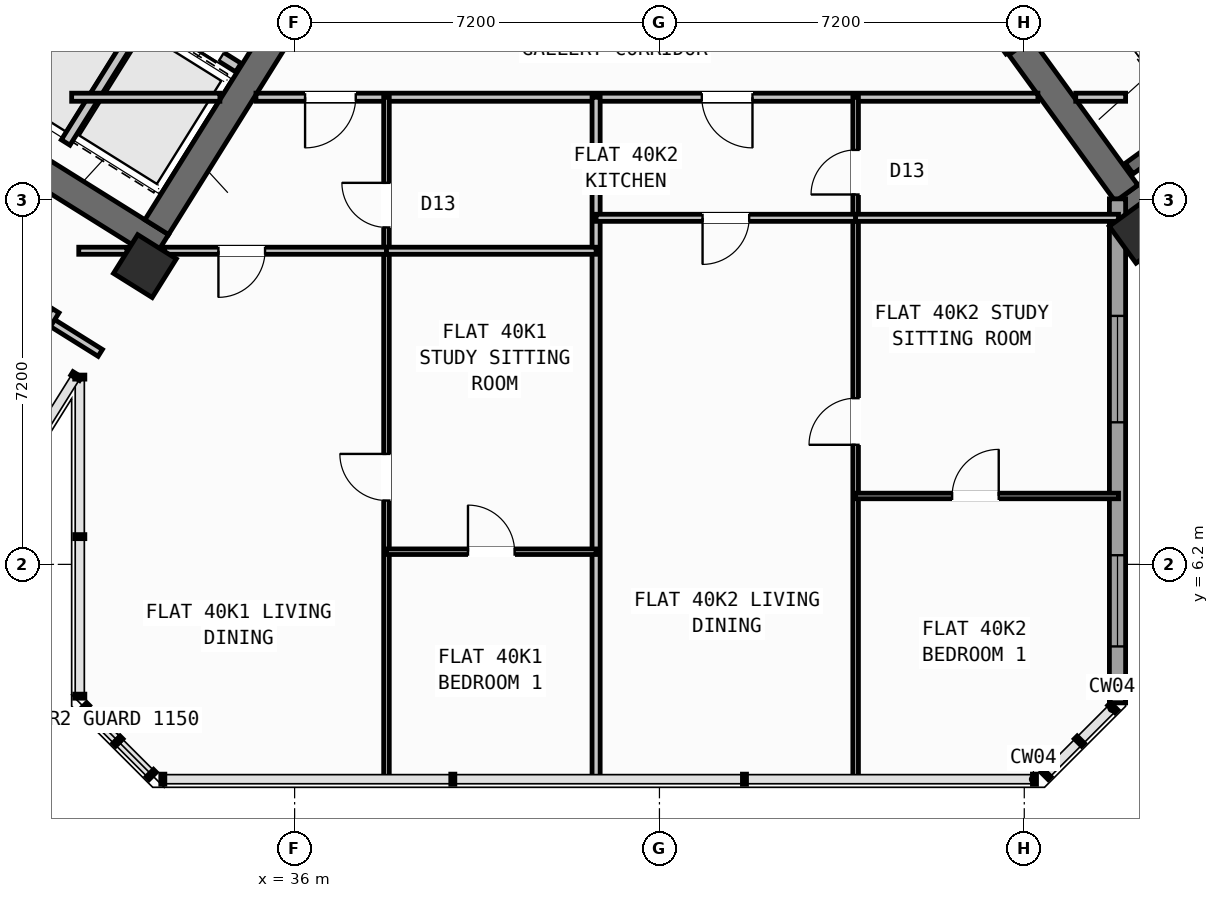
"""IFC4 building model, lengths in metres.
Left out: names, types, materials, properties, quantities, classifications, styles, units other than length and angle.
Written with IfcOpenShell. Run it as: python <this file> out.ifc"""

import sys

from ifc_helpers import new_model, si_unit, direction, frame, frame_2d, origin, origin_2d, place, context, subcontext, project, spatial, rectangle, hollow_rectangle, extrude, source, transform, mapped, element, fill, save


model = new_model("IFC4")
c1 = context("Model", 3, precision=1e-05, world=origin(), true_north=direction((0.0, 1.0)))
c2 = subcontext(c1, "Body", "Model", "MODEL_VIEW")
j1 = project(units=[si_unit("LENGTHUNIT", "METRE"), si_unit("PLANEANGLEUNIT", "RADIAN")], contexts=[c1])
p1 = place(None, origin())
s1 = spatial("IfcSite", under=j1, at=p1, CompositionType="ELEMENT")
p2 = place(p1, origin())
s2 = spatial("IfcBuilding", under=s1, at=p2, CompositionType="ELEMENT")
p3 = place(p2, frame((0.0, 0.0, 158.7)))
s3 = spatial("IfcBuildingStorey", under=s2, at=p3, CompositionType="ELEMENT", Elevation=158.7)
p4 = place(p3, frame((33.366, 12.477, 0.0), z_axis=(0.0, 0.0, 1.0), x_axis=(-0.848047359947, 0.529920442413, 0.0)))
e1 = element("IfcWall", 1, at=p4, inside=s3, PredefinedType="SHEAR", context=c2, shape_type="SweptSolid", body=[
    extrude(rectangle(XDim=13.14, YDim=0.55, at=frame_2d((6.57, 0.0))), origin(), (0.0, 0.0, 1.0), 3.35),
])
p5 = place(p3, frame((36.683, 18.304, 0.0), z_axis=(0.0, 0.0, 1.0), x_axis=(-0.529896466841, -0.848062341122, 0.0)))
e2 = element("IfcWall", 2, at=p5, inside=s3, PredefinedType="SHEAR", context=c2, shape_type="SweptSolid", body=[
    extrude(rectangle(XDim=6.425, YDim=0.55, at=frame_2d((3.212, 0.0))), origin(), (0.0, 0.0, 1.0), 3.35),
])
p6 = place(p3, frame((52.359, 13.14, 0.0), z_axis=(0.0, 0.0, 1.0), x_axis=(0.809014896919, 0.587788139183, 0.0)))
e3 = element("IfcWall", 3, at=p6, inside=s3, PredefinedType="SHEAR", context=c2, shape_type="SweptSolid", body=[
    extrude(rectangle(XDim=12.34, YDim=0.55, at=frame_2d((6.17, 0.0))), origin(), (0.0, 0.0, 1.0), 3.35),
])
p7 = place(p3, frame((52.42, 13.524, 0.0), z_axis=(0.0, 0.0, 1.0), x_axis=(-0.587802113096, 0.809004744015, 0.0)))
e4 = element("IfcWall", 4, at=p7, inside=s3, PredefinedType="SHEAR", context=c2, shape_type="SweptSolid", body=[
    extrude(rectangle(XDim=3.575, YDim=0.55, at=frame_2d((1.788, 0.0))), origin(), (0.0, 0.0, 1.0), 3.35),
])
m1 = source(origin(), c2, "Body", "SweptSolid", [
    extrude(hollow_rectangle(XDim=0.9, YDim=0.9, WallThickness=0.036, at=origin_2d()), origin(), (0.0, 0.0, 1.0), 3.6),
])
for number, where, z_axis, x_axis in (
    (5, (33.046, 12.087, 0.0), (0.0, 0.0, 1.0), (-0.848, 0.53, 0.0)),
    (6, (52.705, 12.773, 0.0), (0.0, 0.0, 1.0), (0.809, 0.588, 0.0)),
):
    element("IfcColumn", number, at=place(p3, frame(where, z_axis=z_axis, x_axis=x_axis)), inside=s3, PredefinedType="COLUMN", context=c2, shape_type="MappedRepresentation", body=[
        mapped(m1, transform((0.0, 0.0, 0.0), scale=1.0)),
    ])
p8 = place(p3, frame((56.581, 7.439, 0.0), z_axis=(0.0, 0.0, 1.0), x_axis=(-0.587771678454, 0.809026856172, 0.0)))
e7 = element("IfcWall", 7, at=p8, inside=s3, PredefinedType="STANDARD", context=c2, shape_type="SweptSolid", body=[
    extrude(rectangle(XDim=6.824, YDim=0.32, at=frame_2d((3.412, 0.0))), origin(), (0.0, 0.0, 1.0), 2.775),
])
p9 = place(p8, frame((1.531, 0.0, 0.8)))
e8 = element("IfcOpeningElement", 8, at=p9, cuts=e7, PredefinedType="OPENING", context=c2, shape_type="SweptSolid", body=[
    extrude(rectangle(XDim=2.1, YDim=1.55, at=frame_2d((1.05, 0.775))), frame((0.0, 0.17, 0.0), z_axis=(0.0, -1.0, 0.0), x_axis=(1.0, 0.0, 0.0)), (0.0, 0.0, 1.0), 0.34),
])
p10 = place(p3, frame((52.24, 13.414, 0.0), z_axis=(0.0, 0.0, 1.0), x_axis=(0.0, -1.0, 0.0)))
e9 = element("IfcWall", 9, at=p10, inside=s3, PredefinedType="STANDARD", context=c2, shape_type="SweptSolid", body=[
    extrude(rectangle(XDim=9.948, YDim=0.32, at=frame_2d((4.974, 0.0))), origin(), (0.0, 0.0, 1.0), 3.35),
])
p11 = place(p10, frame((2.31, 0.0, 0.8)))
e10 = element("IfcOpeningElement", 10, at=p11, cuts=e9, PredefinedType="OPENING", context=c2, shape_type="SweptSolid", body=[
    extrude(rectangle(XDim=2.1, YDim=1.55, at=frame_2d((1.05, 0.775))), frame((0.0, 0.17, 0.0), z_axis=(0.0, -1.0, 0.0), x_axis=(1.0, 0.0, 0.0)), (0.0, 0.0, 1.0), 0.34),
])
p12 = place(p10, frame((7.033, 0.0, 0.85)))
e11 = element("IfcOpeningElement", 11, at=p12, cuts=e9, PredefinedType="OPENING", context=c2, shape_type="SweptSolid", body=[
    extrude(rectangle(XDim=1.8, YDim=1.5, at=frame_2d((0.9, 0.75))), frame((0.0, 0.17, 0.0), z_axis=(0.0, -1.0, 0.0), x_axis=(1.0, 0.0, 0.0)), (0.0, 0.0, 1.0), 0.34),
])
p13 = place(p3, frame((31.288, 18.256, 0.0), z_axis=(0.0, 0.0, 1.0), x_axis=(-0.529943379326, -0.848033026897, 0.0)))
e12 = element("IfcWall", 12, at=p13, inside=s3, PredefinedType="SHEAR", context=c2, shape_type="SweptSolid", body=[
    extrude(rectangle(XDim=3.16, YDim=0.26, at=frame_2d((1.58, 0.0))), origin(), (0.0, 0.0, 1.0), 3.35),
])
p14 = place(p3, frame((34.891, 16.005, 0.0), z_axis=(0.0, 0.0, 1.0), x_axis=(-0.848062873452, 0.529895614884, 0.0)))
e13 = element("IfcWall", 13, at=p14, inside=s3, PredefinedType="STANDARD", context=c2, shape_type="SweptSolid", body=[
    extrude(rectangle(XDim=4.248, YDim=0.2, at=frame_2d((2.124, 0.0))), origin(), (0.0, 0.0, 1.0), 3.34),
])
p15 = place(p14, frame((0.398, 0.0, 0.0)))
e14 = element("IfcOpeningElement", 14, at=p15, cuts=e13, PredefinedType="OPENING", context=c2, shape_type="SweptSolid", body=[
    extrude(rectangle(XDim=1.3, YDim=2.2, at=frame_2d((0.65, 1.1))), frame((0.0, 0.11, 0.0), z_axis=(0.0, -1.0, 0.0), x_axis=(1.0, 0.0, 0.0)), (0.0, 0.0, 1.0), 0.22),
])
p16 = place(p14, frame((2.473, 0.0, 0.0)))
e15 = element("IfcOpeningElement", 15, at=p16, cuts=e13, PredefinedType="OPENING", context=c2, shape_type="SweptSolid", body=[
    extrude(rectangle(XDim=1.45, YDim=2.25, at=frame_2d((0.725, 1.125))), frame((0.0, 0.11, 0.0), z_axis=(0.0, -1.0, 0.0), x_axis=(1.0, 0.0, 0.0)), (0.0, 0.0, 1.0), 0.22),
])
p17 = place(p3, frame((33.029, 17.003, 0.0), z_axis=(0.0, 0.0, 1.0), x_axis=(-0.529916267533, -0.848049968695, 0.0)))
e16 = element("IfcWall", 16, at=p17, inside=s3, PredefinedType="STANDARD", context=c2, shape_type="SweptSolid", body=[
    extrude(rectangle(XDim=2.92, YDim=0.2, at=frame_2d((1.46, 0.0))), origin(), (0.0, 0.0, 1.0), 3.34),
])
p18 = place(p3, frame((52.472, 14.013, 0.0), z_axis=(0.0, 0.0, 1.0), x_axis=(0.809028366311, 0.587769599847, 0.0)))
e17 = element("IfcWall", 17, at=p18, inside=s3, PredefinedType="SHEAR", context=c2, shape_type="SweptSolid", body=[
    extrude(rectangle(XDim=7.33, YDim=0.26, at=frame_2d((3.665, 0.0))), origin(), (0.0, 0.0, 1.0), 3.35),
])
p19 = place(p3, frame((32.164, 10.374, 0.0), z_axis=(0.0, 0.0, 1.0), x_axis=(-0.848044107957, 0.529925646633, 0.0)))
e18 = element("IfcWall", 18, at=p19, inside=s3, PredefinedType="PARTITIONING", context=c2, shape_type="SweptSolid", body=[
    extrude(rectangle(XDim=15.57, YDim=0.16, at=frame_2d((7.785, 0.0))), origin(), (0.0, 0.0, 1.0), 3.34),
])
p20 = place(p19, frame((10.83, 0.0, 0.0)))
e19 = element("IfcOpeningElement", 19, at=p20, cuts=e18, PredefinedType="OPENING", context=c2, shape_type="SweptSolid", body=[
    extrude(rectangle(XDim=1.0, YDim=2.1, at=frame_2d((0.5, 1.05))), frame((0.0, 0.09, 0.0), z_axis=(0.0, -1.0, 0.0), x_axis=(1.0, 0.0, 0.0)), (0.0, 0.0, 1.0), 0.18),
])
p21 = place(p3, frame((31.282, 11.208, 0.0), z_axis=(0.0, 0.0, 1.0), x_axis=(-0.529938869374, -0.84803584519, 0.0)))
e20 = element("IfcWall", 20, at=p21, inside=s3, PredefinedType="PARTITIONING", context=c2, shape_type="SweptSolid", body=[
    extrude(rectangle(XDim=5.48, YDim=0.16, at=frame_2d((2.74, 0.0))), origin(), (0.0, 0.0, 1.0), 3.34),
])
p22 = place(p3, frame((31.6, 15.42, 0.0), z_axis=(0.0, 0.0, 1.0), x_axis=(1.0, 0.0, 0.0)))
e21 = element("IfcWall", 21, at=p22, inside=s3, PredefinedType="PARTITIONING", context=c2, shape_type="SweptSolid", body=[
    extrude(rectangle(XDim=2.925, YDim=0.16, at=frame_2d((1.462, 0.0))), origin(), (0.0, 0.0, 1.0), 3.34),
])
p23 = place(p3, frame((35.237, 15.42, 0.0), z_axis=(0.0, 0.0, 1.0), x_axis=(1.0, 0.0, 0.0)))
e22 = element("IfcWall", 22, at=p23, inside=s3, PredefinedType="PARTITIONING", context=c2, shape_type="SweptSolid", body=[
    extrude(rectangle(XDim=15.432, YDim=0.16, at=frame_2d((7.716, 0.0))), origin(), (0.0, 0.0, 1.0), 3.34),
])
p24 = place(p23, frame((0.969, 0.0, 0.0)))
e23 = element("IfcOpeningElement", 23, at=p24, cuts=e22, PredefinedType="OPENING", context=c2, shape_type="SweptSolid", body=[
    extrude(rectangle(XDim=1.0, YDim=2.1, at=frame_2d((0.5, 1.05))), frame((0.0, 0.09, 0.0), z_axis=(0.0, -1.0, 0.0), x_axis=(1.0, 0.0, 0.0)), (0.0, 0.0, 1.0), 0.18),
])
p25 = place(p23, frame((8.799, 0.0, 0.0)))
e24 = element("IfcOpeningElement", 24, at=p25, cuts=e22, PredefinedType="OPENING", context=c2, shape_type="SweptSolid", body=[
    extrude(rectangle(XDim=1.0, YDim=2.1, at=frame_2d((0.5, 1.05))), frame((0.0, 0.09, 0.0), z_axis=(0.0, -1.0, 0.0), x_axis=(1.0, 0.0, 0.0)), (0.0, 0.0, 1.0), 0.18),
])
p26 = place(p3, frame((51.416, 15.42, 0.0), z_axis=(0.0, 0.0, 1.0), x_axis=(1.0, 0.0, 0.0)))
e25 = element("IfcWall", 25, at=p26, inside=s3, PredefinedType="PARTITIONING", context=c2, shape_type="SweptSolid", body=[
    extrude(rectangle(XDim=0.984, YDim=0.16, at=frame_2d((0.492, 0.0))), origin(), (0.0, 0.0, 1.0), 3.34),
])
p27 = place(p3, frame((50.119, 16.333, 0.0), z_axis=(0.0, 0.0, 1.0), x_axis=(-0.587749856981, 0.809042709391, 0.0)))
e26 = element("IfcWall", 26, at=p27, inside=s3, PredefinedType="STANDARD", context=c2, shape_type="SweptSolid", body=[
    extrude(rectangle(XDim=2.96, YDim=0.2, at=frame_2d((1.48, 0.0))), origin(), (0.0, 0.0, 1.0), 3.34),
])
p28 = place(p27, frame((0.53, 0.0, 0.0)))
e27 = element("IfcOpeningElement", 27, at=p28, cuts=e26, PredefinedType="OPENING", context=c2, shape_type="SweptSolid", body=[
    extrude(rectangle(XDim=1.5, YDim=2.15, at=frame_2d((0.75, 1.075))), frame((0.0, 0.11, 0.0), z_axis=(0.0, -1.0, 0.0), x_axis=(1.0, 0.0, 0.0)), (0.0, 0.0, 1.0), 0.22),
])
p29 = place(p3, frame((41.95, 1.96, 0.0), z_axis=(0.0, 0.0, 1.0), x_axis=(0.0, 1.0, 0.0)))
e28 = element("IfcWall", 28, at=p29, inside=s3, PredefinedType="PARTITIONING", context=c2, shape_type="SweptSolid", body=[
    extrude(rectangle(XDim=13.46, YDim=0.16, at=frame_2d((6.73, 0.0))), origin(), (0.0, 0.0, 1.0), 3.34),
])
p30 = place(p3, frame((37.813, 1.96, 0.0), z_axis=(0.0, 0.0, 1.0), x_axis=(0.0, 1.0, 0.0)))
e29 = element("IfcWall", 29, at=p30, inside=s3, PredefinedType="PARTITIONING", context=c2, shape_type="SweptSolid", body=[
    extrude(rectangle(XDim=13.46, YDim=0.11, at=frame_2d((6.73, 0.0))), origin(), (0.0, 0.0, 1.0), 3.34),
])
p31 = place(p30, frame((5.5, 0.0, 0.0)))
e30 = element("IfcOpeningElement", 30, at=p31, cuts=e29, PredefinedType="OPENING", context=c2, shape_type="SweptSolid", body=[
    extrude(rectangle(XDim=0.92, YDim=2.08, at=frame_2d((0.46, 1.04))), frame((0.0, 0.065, 0.0), z_axis=(0.0, -1.0, 0.0), x_axis=(1.0, 0.0, 0.0)), (0.0, 0.0, 1.0), 0.13),
])
p32 = place(p30, frame((10.89, 0.0, 0.0)))
e31 = element("IfcOpeningElement", 31, at=p32, cuts=e29, PredefinedType="OPENING", context=c2, shape_type="SweptSolid", body=[
    extrude(rectangle(XDim=0.88, YDim=2.08, at=frame_2d((0.44, 1.04))), frame((0.0, 0.065, 0.0), z_axis=(0.0, -1.0, 0.0), x_axis=(1.0, 0.0, 0.0)), (0.0, 0.0, 1.0), 0.13),
])
p33 = place(p3, frame((31.74, 12.39, 0.0), z_axis=(0.0, 0.0, 1.0), x_axis=(1.0, 0.0, 0.0)))
e32 = element("IfcWall", 32, at=p33, inside=s3, PredefinedType="PLUMBINGWALL", context=c2, shape_type="SweptSolid", body=[
    extrude(rectangle(XDim=0.951, YDim=0.14, at=frame_2d((0.475, 0.0))), origin(), (0.0, 0.0, 1.0), 3.34),
])
p34 = place(p3, frame((33.433, 12.39, 0.0), z_axis=(0.0, 0.0, 1.0), x_axis=(1.0, 0.0, 0.0)))
e33 = element("IfcWall", 33, at=p34, inside=s3, PredefinedType="PLUMBINGWALL", context=c2, shape_type="SweptSolid", body=[
    extrude(rectangle(XDim=4.38, YDim=0.14, at=frame_2d((2.19, 0.0))), origin(), (0.0, 0.0, 1.0), 2.525),
])
p35 = place(p34, frame((1.064, 0.0, 0.0)))
e34 = element("IfcOpeningElement", 34, at=p35, cuts=e33, PredefinedType="OPENING", context=c2, shape_type="SweptSolid", body=[
    extrude(rectangle(XDim=0.92, YDim=2.08, at=frame_2d((0.46, 1.04))), frame((0.0, 0.08, 0.0), z_axis=(0.0, -1.0, 0.0), x_axis=(1.0, 0.0, 0.0)), (0.0, 0.0, 1.0), 0.16),
])
p36 = place(p3, frame((37.813, 12.39, 0.0), z_axis=(0.0, 0.0, 1.0), x_axis=(1.0, 0.0, 0.0)))
e35 = element("IfcWall", 35, at=p36, inside=s3, PredefinedType="PLUMBINGWALL", context=c2, shape_type="SweptSolid", body=[
    extrude(rectangle(XDim=4.137, YDim=0.14, at=frame_2d((2.068, 0.0))), origin(), (0.0, 0.0, 1.0), 2.525),
])
p37 = place(p3, frame((37.813, 6.45, 0.0), z_axis=(0.0, 0.0, 1.0), x_axis=(1.0, 0.0, 0.0)))
e36 = element("IfcWall", 36, at=p37, inside=s3, PredefinedType="PARTITIONING", context=c2, shape_type="SweptSolid", body=[
    extrude(rectangle(XDim=4.137, YDim=0.11, at=frame_2d((2.068, 0.0))), origin(), (0.0, 0.0, 1.0), 3.34),
])
p38 = place(p37, frame((1.608, 0.0, 0.0)))
e37 = element("IfcOpeningElement", 37, at=p38, cuts=e36, PredefinedType="OPENING", context=c2, shape_type="SweptSolid", body=[
    extrude(rectangle(XDim=0.92, YDim=2.08, at=frame_2d((0.46, 1.04))), frame((0.0, 0.065, 0.0), z_axis=(0.0, -1.0, 0.0), x_axis=(1.0, 0.0, 0.0)), (0.0, 0.0, 1.0), 0.13),
])
p39 = place(p3, frame((47.072, 1.96, 0.0), z_axis=(0.0, 0.0, 1.0), x_axis=(0.0, 1.0, 0.0)))
e38 = element("IfcWall", 38, at=p39, inside=s3, PredefinedType="PARTITIONING", context=c2, shape_type="SweptSolid", body=[
    extrude(rectangle(XDim=13.46, YDim=0.11, at=frame_2d((6.73, 0.0))), origin(), (0.0, 0.0, 1.0), 3.34),
])
p40 = place(p39, frame((6.6, 0.0, 0.0)))
e39 = element("IfcOpeningElement", 39, at=p40, cuts=e38, PredefinedType="OPENING", context=c2, shape_type="SweptSolid", body=[
    extrude(rectangle(XDim=0.92, YDim=2.08, at=frame_2d((0.46, 1.04))), frame((0.0, 0.065, 0.0), z_axis=(0.0, -1.0, 0.0), x_axis=(1.0, 0.0, 0.0)), (0.0, 0.0, 1.0), 0.13),
])
p41 = place(p39, frame((11.54, 0.0, 0.0)))
e40 = element("IfcOpeningElement", 40, at=p41, cuts=e38, PredefinedType="OPENING", context=c2, shape_type="SweptSolid", body=[
    extrude(rectangle(XDim=0.88, YDim=2.08, at=frame_2d((0.44, 1.04))), frame((0.0, 0.065, 0.0), z_axis=(0.0, -1.0, 0.0), x_axis=(1.0, 0.0, 0.0)), (0.0, 0.0, 1.0), 0.13),
])
p42 = place(p3, frame((41.95, 13.04, 0.0), z_axis=(0.0, 0.0, 1.0), x_axis=(1.0, 0.0, 0.0)))
e41 = element("IfcWall", 41, at=p42, inside=s3, PredefinedType="PLUMBINGWALL", context=c2, shape_type="SweptSolid", body=[
    extrude(rectangle(XDim=5.122, YDim=0.14, at=frame_2d((2.561, 0.0))), origin(), (0.0, 0.0, 1.0), 3.34),
])
p43 = place(p42, frame((2.101, 0.0, 0.0)))
e42 = element("IfcOpeningElement", 42, at=p43, cuts=e41, PredefinedType="OPENING", context=c2, shape_type="SweptSolid", body=[
    extrude(rectangle(XDim=0.92, YDim=2.08, at=frame_2d((0.46, 1.04))), frame((0.0, 0.08, 0.0), z_axis=(0.0, -1.0, 0.0), x_axis=(1.0, 0.0, 0.0)), (0.0, 0.0, 1.0), 0.16),
])
p44 = place(p3, frame((47.072, 13.04, 0.0), z_axis=(0.0, 0.0, 1.0), x_axis=(1.0, 0.0, 0.0)))
e43 = element("IfcWall", 43, at=p44, inside=s3, PredefinedType="PLUMBINGWALL", context=c2, shape_type="SweptSolid", body=[
    extrude(rectangle(XDim=5.188, YDim=0.14, at=frame_2d((2.594, 0.0))), origin(), (0.0, 0.0, 1.0), 2.525),
])
p45 = place(p3, frame((47.072, 7.55, 0.0), z_axis=(0.0, 0.0, 1.0), x_axis=(1.0, 0.0, 0.0)))
e44 = element("IfcWall", 44, at=p45, inside=s3, PredefinedType="PARTITIONING", context=c2, shape_type="SweptSolid", body=[
    extrude(rectangle(XDim=5.188, YDim=0.11, at=frame_2d((2.594, 0.0))), origin(), (0.0, 0.0, 1.0), 3.34),
])
p46 = place(p45, frame((1.904, 0.0, 0.0)))
e45 = element("IfcOpeningElement", 45, at=p46, cuts=e44, PredefinedType="OPENING", context=c2, shape_type="SweptSolid", body=[
    extrude(rectangle(XDim=0.92, YDim=2.08, at=frame_2d((0.46, 1.04))), frame((0.0, 0.065, 0.0), z_axis=(0.0, -1.0, 0.0), x_axis=(1.0, 0.0, 0.0)), (0.0, 0.0, 1.0), 0.13),
])
m2 = source(origin(), c2, "Body", "SweptSolid", [
    extrude(rectangle(XDim=2.1, YDim=1.55, at=frame_2d((1.05, 0.775))), frame((0.0, 0.03, 0.0), z_axis=(0.0, -1.0, 0.0), x_axis=(1.0, 0.0, 0.0)), (0.0, 0.0, 1.0), 0.06),
])
p47 = place(p11, origin())
e46 = element("IfcWindow", 46, at=p47, inside=s3, PartitioningType="SINGLE_PANEL", PredefinedType="WINDOW", context=c2, shape_type="MappedRepresentation", body=[
    mapped(m2, transform((0.0, 0.0, 0.0), scale=1.0)),
])
fill(e10, e46)
m3 = source(origin(), c2, "Body", "SweptSolid", [
    extrude(rectangle(XDim=1.8, YDim=1.5, at=frame_2d((0.9, 0.75))), frame((0.0, 0.03, 0.0), z_axis=(0.0, -1.0, 0.0), x_axis=(1.0, 0.0, 0.0)), (0.0, 0.0, 1.0), 0.06),
])
p48 = place(p12, origin())
e47 = element("IfcWindow", 47, at=p48, inside=s3, PartitioningType="SINGLE_PANEL", PredefinedType="WINDOW", context=c2, shape_type="MappedRepresentation", body=[
    mapped(m3, transform((0.0, 0.0, 0.0), scale=1.0)),
])
fill(e11, e47)
m4 = source(origin(), c2, "Body", "SweptSolid", [
    extrude(rectangle(XDim=1.3, YDim=2.2, at=frame_2d((0.65, 1.1))), frame((0.0, 0.025, 0.0), z_axis=(0.0, -1.0, 0.0), x_axis=(1.0, 0.0, 0.0)), (0.0, 0.0, 1.0), 0.05),
])
p49 = place(p15, origin())
e48 = element("IfcDoor", 48, at=p49, inside=s3, OperationType="DOUBLE_DOOR_SLIDING", PredefinedType="DOOR", context=c2, shape_type="MappedRepresentation", body=[
    mapped(m4, transform((0.0, 0.0, 0.0), scale=1.0)),
])
fill(e14, e48)
m5 = source(origin(), c2, "Body", "SweptSolid", [
    extrude(rectangle(XDim=0.92, YDim=2.08, at=frame_2d((0.46, 1.04))), frame((0.0, 0.025, 0.0), z_axis=(0.0, -1.0, 0.0), x_axis=(1.0, 0.0, 0.0)), (0.0, 0.0, 1.0), 0.05),
])
p50 = place(p31, origin())
e49 = element("IfcDoor", 49, at=p50, inside=s3, OperationType="SINGLE_SWING_RIGHT", PredefinedType="DOOR", context=c2, shape_type="MappedRepresentation", body=[
    mapped(m5, transform((0.0, 0.0, 0.0), scale=1.0)),
])
fill(e30, e49)
p51 = place(p38, origin())
e50 = element("IfcDoor", 50, at=p51, inside=s3, OperationType="SINGLE_SWING_LEFT", PredefinedType="DOOR", context=c2, shape_type="MappedRepresentation", body=[
    mapped(m5, transform((0.0, 0.0, 0.0), scale=1.0)),
])
fill(e37, e50)
m6 = source(origin(), c2, "Body", "SweptSolid", [
    extrude(rectangle(XDim=1.0, YDim=2.1, at=frame_2d((0.5, 1.05))), frame((0.0, 0.025, 0.0), z_axis=(0.0, -1.0, 0.0), x_axis=(1.0, 0.0, 0.0)), (0.0, 0.0, 1.0), 0.05),
])
p52 = place(p24, frame((1.0, 0.0, 0.0), z_axis=(0.0, 0.0, 1.0), x_axis=(-1.0, 0.0, 0.0)))
e51 = element("IfcDoor", 51, at=p52, inside=s3, OperationType="SINGLE_SWING_RIGHT", PredefinedType="DOOR", context=c2, shape_type="MappedRepresentation", body=[
    mapped(m6, transform((0.0, 0.0, 0.0), scale=1.0)),
])
fill(e23, e51)
p53 = place(p35, frame((0.92, 0.0, 0.0), z_axis=(0.0, 0.0, 1.0), x_axis=(-1.0, 0.0, 0.0)))
e52 = element("IfcDoor", 52, at=p53, inside=s3, OperationType="SINGLE_SWING_RIGHT", PredefinedType="DOOR", context=c2, shape_type="MappedRepresentation", body=[
    mapped(m5, transform((0.0, 0.0, 0.0), scale=1.0)),
])
fill(e34, e52)
m7 = source(origin(), c2, "Body", "SweptSolid", [
    extrude(rectangle(XDim=0.88, YDim=2.08, at=frame_2d((0.44, 1.04))), frame((0.0, 0.025, 0.0), z_axis=(0.0, -1.0, 0.0), x_axis=(1.0, 0.0, 0.0)), (0.0, 0.0, 1.0), 0.05),
])
p54 = place(p32, origin())
e53 = element("IfcDoor", 53, at=p54, inside=s3, OperationType="SINGLE_SWING_RIGHT", PredefinedType="DOOR", context=c2, shape_type="MappedRepresentation", body=[
    mapped(m7, transform((0.0, 0.0, 0.0), scale=1.0)),
])
fill(e31, e53)
p55 = place(p40, origin())
e54 = element("IfcDoor", 54, at=p55, inside=s3, OperationType="SINGLE_SWING_LEFT", PredefinedType="DOOR", context=c2, shape_type="MappedRepresentation", body=[
    mapped(m5, transform((0.0, 0.0, 0.0), scale=1.0)),
])
fill(e39, e54)
p56 = place(p46, origin())
e55 = element("IfcDoor", 55, at=p56, inside=s3, OperationType="SINGLE_SWING_RIGHT", PredefinedType="DOOR", context=c2, shape_type="MappedRepresentation", body=[
    mapped(m5, transform((0.0, 0.0, 0.0), scale=1.0)),
])
fill(e45, e55)
p57 = place(p25, frame((1.0, 0.0, 0.0), z_axis=(0.0, 0.0, 1.0), x_axis=(-1.0, 0.0, 0.0)))
e56 = element("IfcDoor", 56, at=p57, inside=s3, OperationType="SINGLE_SWING_LEFT", PredefinedType="DOOR", context=c2, shape_type="MappedRepresentation", body=[
    mapped(m6, transform((0.0, 0.0, 0.0), scale=1.0)),
])
fill(e24, e56)
p58 = place(p43, frame((0.92, 0.0, 0.0), z_axis=(0.0, 0.0, 1.0), x_axis=(-1.0, 0.0, 0.0)))
e57 = element("IfcDoor", 57, at=p58, inside=s3, OperationType="SINGLE_SWING_RIGHT", PredefinedType="DOOR", context=c2, shape_type="MappedRepresentation", body=[
    mapped(m5, transform((0.0, 0.0, 0.0), scale=1.0)),
])
fill(e42, e57)
p59 = place(p41, origin())
e58 = element("IfcDoor", 58, at=p59, inside=s3, OperationType="SINGLE_SWING_LEFT", PredefinedType="DOOR", context=c2, shape_type="MappedRepresentation", body=[
    mapped(m7, transform((0.0, 0.0, 0.0), scale=1.0)),
])
fill(e40, e58)
save(model, sys.argv[1])
